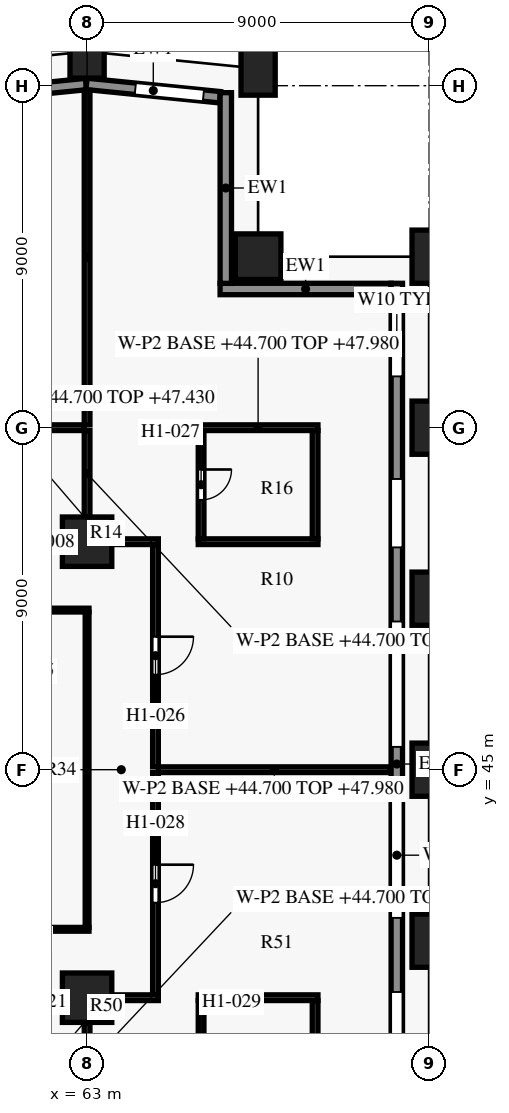
"""IFC4 building model, lengths in metres.
Left out: names, types, materials, properties, quantities, classifications, styles, units other than length and angle.
Written with IfcOpenShell. Run it as: python <this file> out.ifc"""

import sys

from ifc_helpers import new_model, si_unit, direction, frame, frame_2d, origin, origin_2d, place, context, subcontext, project, spatial, rectangle, extrude, element, fill, save


model = new_model("IFC4")
c1 = context("Model", 3, precision=1e-05, world=origin(), true_north=direction((0.0, 1.0)))
c2 = subcontext(c1, "Body", "Model", "MODEL_VIEW")
j1 = project(units=[si_unit("LENGTHUNIT", "METRE"), si_unit("PLANEANGLEUNIT", "RADIAN")], contexts=[c1])
p1 = place(None, origin())
s1 = spatial("IfcSite", under=j1, at=p1, CompositionType="ELEMENT")
p2 = place(p1, origin())
s2 = spatial("IfcBuilding", under=s1, at=p2, CompositionType="ELEMENT")
p3 = place(p2, frame((0.0, 0.0, 44.7)))
s3 = spatial("IfcBuildingStorey", under=s2, at=p3, CompositionType="ELEMENT", Elevation=44.7)
for number, where, z_axis, x_axis in (
    (1, (72.0, 40.5, 0.0), (0.0, 0.0, 1.0), (0.0, 1.0, 0.0)),
    (2, (72.0, 45.0, 0.0), (0.0, 0.0, 1.0), (0.0, 1.0, 0.0)),
    (3, (72.0, 49.5, 0.0), (0.0, 0.0, 1.0), (0.0, 1.0, 0.0)),
    (4, (72.0, 54.0, 0.0), (0.0, 0.0, 1.0), (0.0, 1.0, 0.0)),
    (5, (72.0, 58.5, 0.0), (0.0, 0.0, 1.0), (0.0, 1.0, 0.0)),
    (6, (67.5, 63.45, 0.0), (0.0, 0.0, 1.0), (-0.995, 0.1, 0.0)),
    (7, (63.0, 63.9, 0.0), (0.0, 0.0, 1.0), (-1.0, 0.0, 0.0)),
):
    element("IfcColumn", number, at=place(p3, frame(where, z_axis=z_axis, x_axis=x_axis)), inside=s3, PredefinedType="COLUMN", context=c2, shape_type="SweptSolid", body=[
        extrude(rectangle(XDim=0.9, YDim=1.4, at=origin_2d()), origin(), (0.0, 0.0, 1.0), 3.6),
    ])
p4 = place(p3, frame((67.5, 58.5, 0.0), z_axis=(0.0, 0.0, 1.0), x_axis=(1.0, 0.0, 0.0)))
e8 = element("IfcColumn", 8, at=p4, inside=s3, PredefinedType="COLUMN", context=c2, shape_type="SweptSolid", body=[
    extrude(rectangle(XDim=1.2, YDim=1.2, at=origin_2d()), origin(), (0.0, 0.0, 1.0), 3.6),
])
for number, where, z_axis, x_axis in (
    (9, (63.0, 39.0, 0.0), (0.0, 0.0, 1.0), (1.0, 0.0, 0.0)),
    (10, (63.0, 51.0, 0.0), (0.0, 0.0, 1.0), (1.0, 0.0, 0.0)),
):
    element("IfcColumn", number, at=place(p3, frame(where, z_axis=z_axis, x_axis=x_axis)), inside=s3, PredefinedType="COLUMN", context=c2, shape_type="SweptSolid", body=[
        extrude(rectangle(XDim=1.3, YDim=1.3, at=origin_2d()), origin(), (0.0, 0.0, 1.0), 3.6),
    ])
p5 = place(p3, frame((71.15, 57.8, 0.0), z_axis=(0.0, 0.0, 1.0), x_axis=(0.0, -1.0, 0.0)))
e11 = element("IfcWall", 11, at=p5, inside=s3, PredefinedType="SOLIDWALL", context=c2, shape_type="SweptSolid", body=[
    extrude(rectangle(XDim=25.302, YDim=0.3, at=frame_2d((12.651, 0.0))), origin(), (0.0, 0.0, 1.0), 2.95),
])
p6 = place(p5, frame((0.65, 0.0, 0.75)))
e12 = element("IfcOpeningElement", 12, at=p6, cuts=e11, PredefinedType="OPENING", context=c2, shape_type="SweptSolid", body=[
    extrude(rectangle(XDim=1.8, YDim=1.8, at=frame_2d((0.9, 0.9))), frame((0.0, 0.16, 0.0), z_axis=(0.0, -1.0, 0.0), x_axis=(1.0, 0.0, 0.0)), (0.0, 0.0, 1.0), 0.32),
])
p7 = place(p5, frame((5.15, 0.0, 0.75)))
e13 = element("IfcOpeningElement", 13, at=p7, cuts=e11, PredefinedType="OPENING", context=c2, shape_type="SweptSolid", body=[
    extrude(rectangle(XDim=1.8, YDim=1.8, at=frame_2d((0.9, 0.9))), frame((0.0, 0.16, 0.0), z_axis=(0.0, -1.0, 0.0), x_axis=(1.0, 0.0, 0.0)), (0.0, 0.0, 1.0), 0.32),
])
p8 = place(p5, frame((8.9, 0.0, 0.15)))
e14 = element("IfcOpeningElement", 14, at=p8, cuts=e11, PredefinedType="OPENING", context=c2, shape_type="SweptSolid", body=[
    extrude(rectangle(XDim=3.3, YDim=2.4, at=frame_2d((1.65, 1.2))), frame((0.0, 0.16, 0.0), z_axis=(0.0, -1.0, 0.0), x_axis=(1.0, 0.0, 0.0)), (0.0, 0.0, 1.0), 0.32),
])
p9 = place(p5, frame((13.4, 0.0, 0.15)))
e15 = element("IfcOpeningElement", 15, at=p9, cuts=e11, PredefinedType="OPENING", context=c2, shape_type="SweptSolid", body=[
    extrude(rectangle(XDim=3.3, YDim=2.4, at=frame_2d((1.65, 1.2))), frame((0.0, 0.16, 0.0), z_axis=(0.0, -1.0, 0.0), x_axis=(1.0, 0.0, 0.0)), (0.0, 0.0, 1.0), 0.32),
])
p10 = place(p5, frame((18.65, 0.0, 0.75)))
e16 = element("IfcOpeningElement", 16, at=p10, cuts=e11, PredefinedType="OPENING", context=c2, shape_type="SweptSolid", body=[
    extrude(rectangle(XDim=1.8, YDim=1.8, at=frame_2d((0.9, 0.9))), frame((0.0, 0.16, 0.0), z_axis=(0.0, -1.0, 0.0), x_axis=(1.0, 0.0, 0.0)), (0.0, 0.0, 1.0), 0.32),
])
p11 = place(p5, frame((23.15, 0.0, 0.75)))
e17 = element("IfcOpeningElement", 17, at=p11, cuts=e11, PredefinedType="OPENING", context=c2, shape_type="SweptSolid", body=[
    extrude(rectangle(XDim=1.8, YDim=1.8, at=frame_2d((0.9, 0.9))), frame((0.0, 0.16, 0.0), z_axis=(0.0, -1.0, 0.0), x_axis=(1.0, 0.0, 0.0)), (0.0, 0.0, 1.0), 0.32),
])
p12 = place(p3, frame((66.5, 57.65, 0.0), z_axis=(0.0, 0.0, 1.0), x_axis=(1.0, 0.0, 0.0)))
e18 = element("IfcWall", 18, at=p12, inside=s3, PredefinedType="SOLIDWALL", context=c2, shape_type="SweptSolid", body=[
    extrude(rectangle(XDim=4.5, YDim=0.3, at=frame_2d((2.25, 0.0))), origin(), (0.0, 0.0, 1.0), 2.95),
])
p13 = place(p3, frame((66.65, 62.816, 0.0), z_axis=(0.0, 0.0, 1.0), x_axis=(0.0, -1.0, 0.0)))
e19 = element("IfcWall", 19, at=p13, inside=s3, PredefinedType="SOLIDWALL", context=c2, shape_type="SweptSolid", body=[
    extrude(rectangle(XDim=5.018, YDim=0.3, at=frame_2d((2.509, 0.0))), origin(), (0.0, 0.0, 1.0), 2.95),
])
p14 = place(p3, frame((62.985, 63.047, 0.0), z_axis=(0.0, 0.0, 1.0), x_axis=(0.995031712439, -0.099558481511, 0.0)))
e20 = element("IfcWall", 20, at=p14, inside=s3, PredefinedType="SOLIDWALL", context=c2, shape_type="SweptSolid", body=[
    extrude(rectangle(XDim=3.531, YDim=0.3, at=frame_2d((1.766, 0.0))), origin(), (0.0, 0.0, 1.0), 2.95),
])
p15 = place(p14, frame((1.291, 0.0, 0.75)))
e21 = element("IfcOpeningElement", 21, at=p15, cuts=e20, PredefinedType="OPENING", context=c2, shape_type="SweptSolid", body=[
    extrude(rectangle(XDim=1.8, YDim=1.8, at=frame_2d((0.9, 0.9))), frame((0.0, 0.16, 0.0), z_axis=(0.0, -1.0, 0.0), x_axis=(1.0, 0.0, 0.0)), (0.0, 0.0, 1.0), 0.32),
])
p16 = place(p3, frame((53.985, 62.144, 0.0), z_axis=(0.0, 0.0, 1.0), x_axis=(0.995037993253, 0.099495688264, 0.0)))
e22 = element("IfcWall", 22, at=p16, inside=s3, PredefinedType="SOLIDWALL", context=c2, shape_type="SweptSolid", body=[
    extrude(rectangle(XDim=9.03, YDim=0.3, at=frame_2d((4.515, 0.0))), origin(), (0.0, 0.0, 1.0), 2.95),
])
p17 = place(p16, frame((0.711, 0.0, 0.15)))
e23 = element("IfcOpeningElement", 23, at=p17, cuts=e22, PredefinedType="OPENING", context=c2, shape_type="SweptSolid", body=[
    extrude(rectangle(XDim=3.3, YDim=2.4, at=frame_2d((1.65, 1.2))), frame((0.0, 0.16, 0.0), z_axis=(0.0, -1.0, 0.0), x_axis=(1.0, 0.0, 0.0)), (0.0, 0.0, 1.0), 0.32),
])
p18 = place(p16, frame((5.984, 0.0, 0.75)))
e24 = element("IfcOpeningElement", 24, at=p18, cuts=e22, PredefinedType="OPENING", context=c2, shape_type="SweptSolid", body=[
    extrude(rectangle(XDim=1.8, YDim=1.8, at=frame_2d((0.9, 0.9))), frame((0.0, 0.16, 0.0), z_axis=(0.0, -1.0, 0.0), x_axis=(1.0, 0.0, 0.0)), (0.0, 0.0, 1.0), 0.32),
])
p19 = place(p3, frame((69.0, 36.075, 0.0), z_axis=(0.0, 0.0, 1.0), x_axis=(0.0, 1.0, 0.0)))
e25 = element("IfcWall", 25, at=p19, inside=s3, PredefinedType="PARTITIONING", context=c2, shape_type="SweptSolid", body=[
    extrude(rectangle(XDim=2.85, YDim=0.15, at=frame_2d((1.425, 0.0))), origin(), (0.0, 0.0, 1.0), 2.58),
])
p20 = place(p3, frame((63.0, 38.345, 0.0), z_axis=(0.0, 0.0, 1.0), x_axis=(0.0, -1.0, 0.0)))
e26 = element("IfcWall", 26, at=p20, inside=s3, PredefinedType="PARTITIONING", context=c2, shape_type="SweptSolid", body=[
    extrude(rectangle(XDim=2.27, YDim=0.15, at=frame_2d((1.135, 0.0))), origin(), (0.0, 0.0, 1.0), 2.73),
])
p21 = place(p3, frame((66.0, 38.925, 0.0), z_axis=(0.0, 0.0, 1.0), x_axis=(0.0, -1.0, 0.0)))
e27 = element("IfcWall", 27, at=p21, inside=s3, PredefinedType="PARTITIONING", context=c2, shape_type="SweptSolid", body=[
    extrude(rectangle(XDim=2.85, YDim=0.15, at=frame_2d((1.425, 0.0))), origin(), (0.0, 0.0, 1.0), 2.58),
])
p22 = place(p21, frame((1.025, 0.0, 0.0)))
e28 = element("IfcOpeningElement", 28, at=p22, cuts=e27, PredefinedType="OPENING", context=c2, shape_type="SweptSolid", body=[
    extrude(rectangle(XDim=0.8, YDim=2.1, at=frame_2d((0.4, 1.05))), frame((0.0, 0.085, 0.0), z_axis=(0.0, -1.0, 0.0), x_axis=(1.0, 0.0, 0.0)), (0.0, 0.0, 1.0), 0.17),
])
p23 = place(p3, frame((62.345, 39.0, 0.0), z_axis=(0.0, 0.0, 1.0), x_axis=(-1.0, 0.0, 0.0)))
e29 = element("IfcWall", 29, at=p23, inside=s3, PredefinedType="PARTITIONING", context=c2, shape_type="SweptSolid", body=[
    extrude(rectangle(XDim=1.445, YDim=0.15, at=frame_2d((0.723, 0.0))), origin(), (0.0, 0.0, 1.0), 2.58),
])
p24 = place(p3, frame((64.875, 39.0, 0.0), z_axis=(0.0, 0.0, 1.0), x_axis=(-1.0, 0.0, 0.0)))
e30 = element("IfcWall", 30, at=p24, inside=s3, PredefinedType="PARTITIONING", context=c2, shape_type="SweptSolid", body=[
    extrude(rectangle(XDim=1.22, YDim=0.15, at=frame_2d((0.61, 0.0))), origin(), (0.0, 0.0, 1.0), 2.58),
])
p25 = place(p3, frame((69.075, 39.0, 0.0), z_axis=(0.0, 0.0, 1.0), x_axis=(-1.0, 0.0, 0.0)))
e31 = element("IfcWall", 31, at=p25, inside=s3, PredefinedType="PARTITIONING", context=c2, shape_type="SweptSolid", body=[
    extrude(rectangle(XDim=3.15, YDim=0.15, at=frame_2d((1.575, 0.0))), origin(), (0.0, 0.0, 1.0), 2.58),
])
p26 = place(p3, frame((59.7, 40.8, 0.0), z_axis=(0.0, 0.0, 1.0), x_axis=(1.0, 0.0, 0.0)))
e32 = element("IfcWall", 32, at=p26, inside=s3, PredefinedType="PARTITIONING", context=c2, shape_type="SweptSolid", body=[
    extrude(rectangle(XDim=3.35, YDim=0.1, at=frame_2d((1.675, 0.0))), origin(), (0.0, 0.0, 1.0), 2.73),
])
p27 = place(p3, frame((63.0, 40.85, 0.0), z_axis=(0.0, 0.0, 1.0), x_axis=(0.0, 1.0, 0.0)))
e33 = element("IfcWall", 33, at=p27, inside=s3, PredefinedType="PARTITIONING", context=c2, shape_type="SweptSolid", body=[
    extrude(rectangle(XDim=8.3, YDim=0.1, at=frame_2d((4.15, 0.0))), origin(), (0.0, 0.0, 1.0), 2.73),
])
p28 = place(p3, frame((64.8, 44.925, 0.0), z_axis=(0.0, 0.0, 1.0), x_axis=(0.0, -1.0, 0.0)))
e34 = element("IfcWall", 34, at=p28, inside=s3, PredefinedType="PARTITIONING", context=c2, shape_type="SweptSolid", body=[
    extrude(rectangle(XDim=5.85, YDim=0.15, at=frame_2d((2.925, 0.0))), origin(), (0.0, 0.0, 1.0), 2.58),
])
p29 = place(p28, frame((2.425, 0.0, 0.0)))
e35 = element("IfcOpeningElement", 35, at=p29, cuts=e34, PredefinedType="OPENING", context=c2, shape_type="SweptSolid", body=[
    extrude(rectangle(XDim=1.0, YDim=2.1, at=frame_2d((0.5, 1.05))), frame((0.0, 0.085, 0.0), z_axis=(0.0, -1.0, 0.0), x_axis=(1.0, 0.0, 0.0)), (0.0, 0.0, 1.0), 0.17),
])
p30 = place(p3, frame((70.98, 45.0, 0.0), z_axis=(0.0, 0.0, 1.0), x_axis=(-1.0, 0.0, 0.0)))
e36 = element("IfcWall", 36, at=p30, inside=s3, PredefinedType="PARTITIONING", context=c2, shape_type="SweptSolid", body=[
    extrude(rectangle(XDim=6.105, YDim=0.15, at=frame_2d((3.052, 0.0))), origin(), (0.0, 0.0, 1.0), 3.28),
])
p31 = place(p3, frame((63.05, 49.2, 0.0), z_axis=(0.0, 0.0, 1.0), x_axis=(-1.0, 0.0, 0.0)))
e37 = element("IfcWall", 37, at=p31, inside=s3, PredefinedType="PARTITIONING", context=c2, shape_type="SweptSolid", body=[
    extrude(rectangle(XDim=3.35, YDim=0.1, at=frame_2d((1.675, 0.0))), origin(), (0.0, 0.0, 1.0), 2.73),
])
p32 = place(p31, frame((1.25, 0.0, 0.0)))
e38 = element("IfcOpeningElement", 38, at=p32, cuts=e37, PredefinedType="OPENING", context=c2, shape_type="SweptSolid", body=[
    extrude(rectangle(XDim=0.9, YDim=2.1, at=frame_2d((0.45, 1.05))), frame((0.0, 0.06, 0.0), z_axis=(0.0, -1.0, 0.0), x_axis=(1.0, 0.0, 0.0)), (0.0, 0.0, 1.0), 0.12),
])
p33 = place(p3, frame((64.8, 50.925, 0.0), z_axis=(0.0, 0.0, 1.0), x_axis=(0.0, -1.0, 0.0)))
e39 = element("IfcWall", 39, at=p33, inside=s3, PredefinedType="PARTITIONING", context=c2, shape_type="SweptSolid", body=[
    extrude(rectangle(XDim=5.85, YDim=0.15, at=frame_2d((2.925, 0.0))), origin(), (0.0, 0.0, 1.0), 2.58),
])
p34 = place(p33, frame((2.425, 0.0, 0.0)))
e40 = element("IfcOpeningElement", 40, at=p34, cuts=e39, PredefinedType="OPENING", context=c2, shape_type="SweptSolid", body=[
    extrude(rectangle(XDim=1.0, YDim=2.1, at=frame_2d((0.5, 1.05))), frame((0.0, 0.085, 0.0), z_axis=(0.0, -1.0, 0.0), x_axis=(1.0, 0.0, 0.0)), (0.0, 0.0, 1.0), 0.17),
])
p35 = place(p3, frame((60.9, 51.0, 0.0), z_axis=(0.0, 0.0, 1.0), x_axis=(1.0, 0.0, 0.0)))
e41 = element("IfcWall", 41, at=p35, inside=s3, PredefinedType="PARTITIONING", context=c2, shape_type="SweptSolid", body=[
    extrude(rectangle(XDim=1.445, YDim=0.15, at=frame_2d((0.723, 0.0))), origin(), (0.0, 0.0, 1.0), 2.58),
])
p36 = place(p3, frame((63.655, 51.0, 0.0), z_axis=(0.0, 0.0, 1.0), x_axis=(1.0, 0.0, 0.0)))
e42 = element("IfcWall", 42, at=p36, inside=s3, PredefinedType="PARTITIONING", context=c2, shape_type="SweptSolid", body=[
    extrude(rectangle(XDim=1.22, YDim=0.15, at=frame_2d((0.61, 0.0))), origin(), (0.0, 0.0, 1.0), 2.58),
])
p37 = place(p3, frame((65.925, 51.0, 0.0), z_axis=(0.0, 0.0, 1.0), x_axis=(1.0, 0.0, 0.0)))
e43 = element("IfcWall", 43, at=p37, inside=s3, PredefinedType="PARTITIONING", context=c2, shape_type="SweptSolid", body=[
    extrude(rectangle(XDim=3.15, YDim=0.15, at=frame_2d((1.575, 0.0))), origin(), (0.0, 0.0, 1.0), 2.58),
])
p38 = place(p3, frame((69.0, 51.075, 0.0), z_axis=(0.0, 0.0, 1.0), x_axis=(0.0, 1.0, 0.0)))
e44 = element("IfcWall", 44, at=p38, inside=s3, PredefinedType="PARTITIONING", context=c2, shape_type="SweptSolid", body=[
    extrude(rectangle(XDim=2.85, YDim=0.15, at=frame_2d((1.425, 0.0))), origin(), (0.0, 0.0, 1.0), 2.58),
])
p39 = place(p3, frame((63.0, 53.925, 0.0), z_axis=(0.0, 0.0, 1.0), x_axis=(0.0, -1.0, 0.0)))
e45 = element("IfcWall", 45, at=p39, inside=s3, PredefinedType="PARTITIONING", context=c2, shape_type="SweptSolid", body=[
    extrude(rectangle(XDim=2.27, YDim=0.15, at=frame_2d((1.135, 0.0))), origin(), (0.0, 0.0, 1.0), 2.73),
])
p40 = place(p3, frame((66.0, 53.925, 0.0), z_axis=(0.0, 0.0, 1.0), x_axis=(0.0, -1.0, 0.0)))
e46 = element("IfcWall", 46, at=p40, inside=s3, PredefinedType="PARTITIONING", context=c2, shape_type="SweptSolid", body=[
    extrude(rectangle(XDim=2.85, YDim=0.15, at=frame_2d((1.425, 0.0))), origin(), (0.0, 0.0, 1.0), 2.58),
])
p41 = place(p40, frame((1.025, 0.0, 0.0)))
e47 = element("IfcOpeningElement", 47, at=p41, cuts=e46, PredefinedType="OPENING", context=c2, shape_type="SweptSolid", body=[
    extrude(rectangle(XDim=0.8, YDim=2.1, at=frame_2d((0.4, 1.05))), frame((0.0, 0.085, 0.0), z_axis=(0.0, -1.0, 0.0), x_axis=(1.0, 0.0, 0.0)), (0.0, 0.0, 1.0), 0.17),
])
p42 = place(p3, frame((62.925, 54.0, 0.0), z_axis=(0.0, 0.0, 1.0), x_axis=(-1.0, 0.0, 0.0)))
e48 = element("IfcWall", 48, at=p42, inside=s3, PredefinedType="PARTITIONING", context=c2, shape_type="SweptSolid", body=[
    extrude(rectangle(XDim=2.1, YDim=0.15, at=frame_2d((1.05, 0.0))), origin(), (0.0, 0.0, 1.0), 2.73),
])
p43 = place(p3, frame((69.075, 54.0, 0.0), z_axis=(0.0, 0.0, 1.0), x_axis=(-1.0, 0.0, 0.0)))
e49 = element("IfcWall", 49, at=p43, inside=s3, PredefinedType="PARTITIONING", context=c2, shape_type="SweptSolid", body=[
    extrude(rectangle(XDim=3.15, YDim=0.15, at=frame_2d((1.575, 0.0))), origin(), (0.0, 0.0, 1.0), 3.28),
])
p44 = place(p3, frame((63.0, 62.875, 0.0), z_axis=(0.0, 0.0, 1.0), x_axis=(0.0, -1.0, 0.0)))
e50 = element("IfcWall", 50, at=p44, inside=s3, PredefinedType="PARTITIONING", context=c2, shape_type="SweptSolid", body=[
    extrude(rectangle(XDim=8.8, YDim=0.15, at=frame_2d((4.4, 0.0))), origin(), (0.0, 0.0, 1.0), 2.73),
])
p45 = place(p6, origin())
e51 = element("IfcWindow", 51, at=p45, inside=s3, PartitioningType="SINGLE_PANEL", PredefinedType="WINDOW", context=c2, shape_type="SweptSolid", body=[
    extrude(rectangle(XDim=1.8, YDim=1.8, at=frame_2d((0.9, 0.9))), frame((0.0, 0.03, 0.0), z_axis=(0.0, -1.0, 0.0), x_axis=(1.0, 0.0, 0.0)), (0.0, 0.0, 1.0), 0.06),
])
fill(e12, e51)
p46 = place(p7, origin())
e52 = element("IfcWindow", 52, at=p46, inside=s3, PartitioningType="SINGLE_PANEL", PredefinedType="WINDOW", context=c2, shape_type="SweptSolid", body=[
    extrude(rectangle(XDim=1.8, YDim=1.8, at=frame_2d((0.9, 0.9))), frame((0.0, 0.03, 0.0), z_axis=(0.0, -1.0, 0.0), x_axis=(1.0, 0.0, 0.0)), (0.0, 0.0, 1.0), 0.06),
])
fill(e13, e52)
p47 = place(p8, origin())
e53 = element("IfcWindow", 53, at=p47, inside=s3, PartitioningType="SINGLE_PANEL", PredefinedType="WINDOW", context=c2, shape_type="SweptSolid", body=[
    extrude(rectangle(XDim=3.3, YDim=2.4, at=frame_2d((1.65, 1.2))), frame((0.0, 0.03, 0.0), z_axis=(0.0, -1.0, 0.0), x_axis=(1.0, 0.0, 0.0)), (0.0, 0.0, 1.0), 0.06),
])
fill(e14, e53)
p48 = place(p9, origin())
e54 = element("IfcWindow", 54, at=p48, inside=s3, PartitioningType="SINGLE_PANEL", PredefinedType="WINDOW", context=c2, shape_type="SweptSolid", body=[
    extrude(rectangle(XDim=3.3, YDim=2.4, at=frame_2d((1.65, 1.2))), frame((0.0, 0.03, 0.0), z_axis=(0.0, -1.0, 0.0), x_axis=(1.0, 0.0, 0.0)), (0.0, 0.0, 1.0), 0.06),
])
fill(e15, e54)
p49 = place(p10, origin())
e55 = element("IfcWindow", 55, at=p49, inside=s3, PartitioningType="SINGLE_PANEL", PredefinedType="WINDOW", context=c2, shape_type="SweptSolid", body=[
    extrude(rectangle(XDim=1.8, YDim=1.8, at=frame_2d((0.9, 0.9))), frame((0.0, 0.03, 0.0), z_axis=(0.0, -1.0, 0.0), x_axis=(1.0, 0.0, 0.0)), (0.0, 0.0, 1.0), 0.06),
])
fill(e16, e55)
p50 = place(p15, origin())
e56 = element("IfcWindow", 56, at=p50, inside=s3, PartitioningType="SINGLE_PANEL", PredefinedType="WINDOW", context=c2, shape_type="SweptSolid", body=[
    extrude(rectangle(XDim=1.8, YDim=1.8, at=frame_2d((0.9, 0.9))), frame((0.0, 0.03, 0.0), z_axis=(0.0, -1.0, 0.0), x_axis=(1.0, 0.0, 0.0)), (0.0, 0.0, 1.0), 0.06),
])
fill(e21, e56)
p51 = place(p34, origin())
e57 = element("IfcDoor", 57, at=p51, inside=s3, OperationType="SINGLE_SWING_LEFT", PredefinedType="DOOR", context=c2, shape_type="SweptSolid", body=[
    extrude(rectangle(XDim=1.0, YDim=2.1, at=frame_2d((0.5, 1.05))), frame((0.0, 0.025, 0.0), z_axis=(0.0, -1.0, 0.0), x_axis=(1.0, 0.0, 0.0)), (0.0, 0.0, 1.0), 0.05),
])
fill(e40, e57)
p52 = place(p41, origin())
e58 = element("IfcDoor", 58, at=p52, inside=s3, OperationType="SINGLE_SWING_RIGHT", PredefinedType="DOOR", context=c2, shape_type="SweptSolid", body=[
    extrude(rectangle(XDim=0.8, YDim=2.1, at=frame_2d((0.4, 1.05))), frame((0.0, 0.025, 0.0), z_axis=(0.0, -1.0, 0.0), x_axis=(1.0, 0.0, 0.0)), (0.0, 0.0, 1.0), 0.05),
])
fill(e47, e58)
p53 = place(p29, origin())
e59 = element("IfcDoor", 59, at=p53, inside=s3, OperationType="SINGLE_SWING_LEFT", PredefinedType="DOOR", context=c2, shape_type="SweptSolid", body=[
    extrude(rectangle(XDim=1.0, YDim=2.1, at=frame_2d((0.5, 1.05))), frame((0.0, 0.025, 0.0), z_axis=(0.0, -1.0, 0.0), x_axis=(1.0, 0.0, 0.0)), (0.0, 0.0, 1.0), 0.05),
])
fill(e35, e59)
save(model, sys.argv[1])
